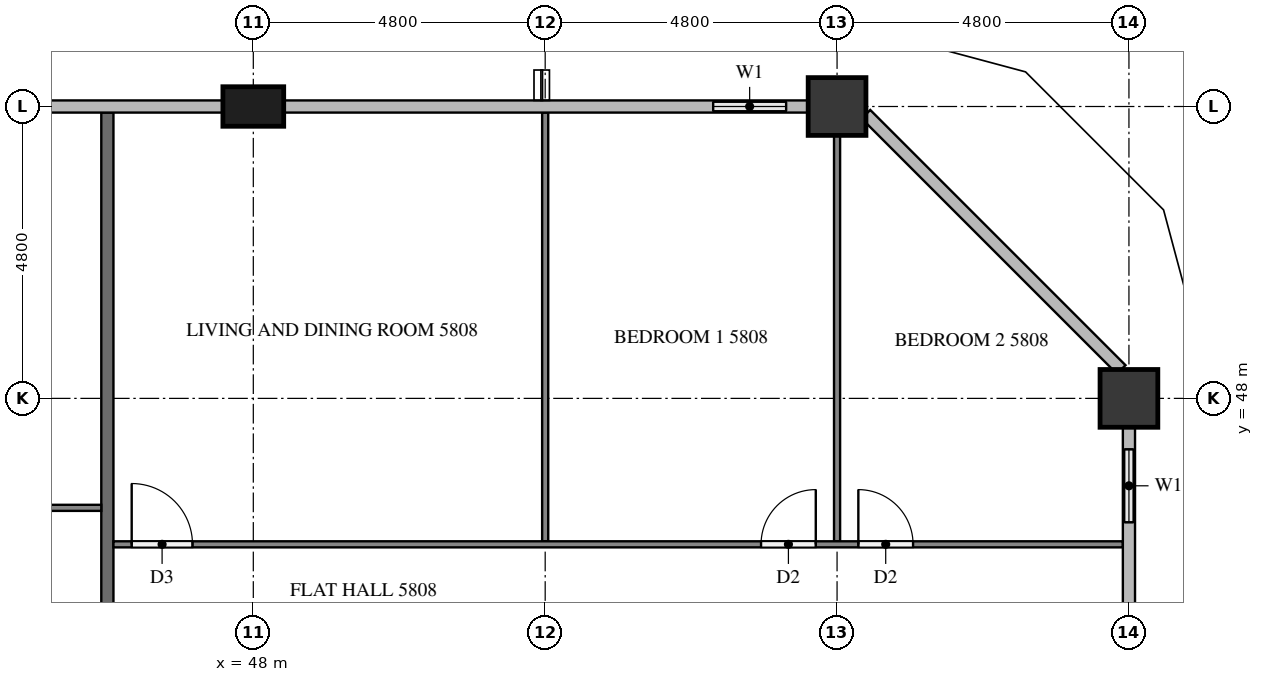
"""IFC4 building model, lengths in metres.
Left out: names, types, materials, properties, quantities, classifications, styles, units other than length and angle.
Written with IfcOpenShell. Run it as: python <this file> out.ifc"""

import sys

from ifc_helpers import new_model, si_unit, direction, frame, frame_2d, origin, origin_2d, place, context, subcontext, project, spatial, rectangle, extrude, element, fill, save


model = new_model("IFC4")
c1 = context("Model", 3, precision=1e-05, world=origin(), true_north=direction((0.0, 1.0)))
c2 = subcontext(c1, "Body", "Model", "MODEL_VIEW")
j1 = project(units=[si_unit("LENGTHUNIT", "METRE"), si_unit("PLANEANGLEUNIT", "RADIAN")], contexts=[c1])
p1 = place(None, origin())
s1 = spatial("IfcSite", under=j1, at=p1, CompositionType="ELEMENT")
p2 = place(p1, origin())
s2 = spatial("IfcBuilding", under=s1, at=p2, CompositionType="ELEMENT")
p3 = place(p2, frame((0.0, 0.0, 222.8)))
s3 = spatial("IfcBuildingStorey", under=s2, at=p3, CompositionType="ELEMENT", Elevation=222.8)
for number, where, z_axis, x_axis in (
    (1, (62.4, 48.0, 0.0), (0.0, 0.0, 1.0), (1.0, 0.0, 0.0)),
    (2, (57.6, 52.8, 0.0), (0.0, 0.0, 1.0), (1.0, 0.0, 0.0)),
):
    element("IfcColumn", number, at=place(p3, frame(where, z_axis=z_axis, x_axis=x_axis)), inside=s3, PredefinedType="COLUMN", context=c2, shape_type="SweptSolid", body=[
        extrude(rectangle(XDim=0.95, YDim=0.95, at=origin_2d()), origin(), (0.0, 0.0, 1.0), 3.2),
    ])
p4 = place(p3, frame((48.0, 52.8, 0.0), z_axis=(0.0, 0.0, 1.0), x_axis=(1.0, 0.0, 0.0)))
e3 = element("IfcColumn", 3, at=p4, inside=s3, PredefinedType="COLUMN", context=c2, shape_type="SweptSolid", body=[
    extrude(rectangle(XDim=1.0, YDim=0.65, at=origin_2d()), origin(), (0.0, 0.0, 1.0), 3.2),
])
p5 = place(p3, frame((62.4, 45.6, 0.0), z_axis=(0.0, 0.0, 1.0), x_axis=(0.0, 1.0, 0.0)))
e4 = element("IfcWall", 4, at=p5, inside=s3, PredefinedType="SOLIDWALL", context=c2, shape_type="SweptSolid", body=[
    extrude(rectangle(XDim=1.925, YDim=0.15, at=frame_2d((0.962, 0.0))), origin(), (0.0, 0.0, 1.0), 3.2),
])
p6 = place(p5, frame((0.363, 0.0, 0.9)))
e5 = element("IfcOpeningElement", 5, at=p6, cuts=e4, PredefinedType="OPENING", context=c2, shape_type="SweptSolid", body=[
    extrude(rectangle(XDim=1.2, YDim=1.4, at=frame_2d((0.6, 0.7))), frame((0.0, 0.085, 0.0), z_axis=(0.0, -1.0, 0.0), x_axis=(1.0, 0.0, 0.0)), (0.0, 0.0, 1.0), 0.17),
])
p7 = place(p3, frame((57.125, 52.8, 0.0), z_axis=(0.0, 0.0, 1.0), x_axis=(-1.0, 0.0, 0.0)))
e6 = element("IfcWall", 6, at=p7, inside=s3, PredefinedType="SOLIDWALL", context=c2, shape_type="SweptSolid", body=[
    extrude(rectangle(XDim=1.925, YDim=0.15, at=frame_2d((0.962, 0.0))), origin(), (0.0, 0.0, 1.0), 3.2),
])
p8 = place(p7, frame((0.363, 0.0, 0.9)))
e7 = element("IfcOpeningElement", 7, at=p8, cuts=e6, PredefinedType="OPENING", context=c2, shape_type="SweptSolid", body=[
    extrude(rectangle(XDim=1.2, YDim=1.4, at=frame_2d((0.6, 0.7))), frame((0.0, 0.085, 0.0), z_axis=(0.0, -1.0, 0.0), x_axis=(1.0, 0.0, 0.0)), (0.0, 0.0, 1.0), 0.17),
])
p9 = place(p3, frame((45.6, 52.7, 0.0), z_axis=(0.0, 0.0, 1.0), x_axis=(0.0, -1.0, 0.0)))
e8 = element("IfcWall", 8, at=p9, inside=s3, PredefinedType="PARTITIONING", context=c2, shape_type="SweptSolid", body=[
    extrude(rectangle(XDim=11.8, YDim=0.2, at=frame_2d((5.9, 0.0))), origin(), (0.0, 0.0, 1.0), 3.2),
])
p10 = place(p3, frame((52.8, 45.65, 0.0), z_axis=(0.0, 0.0, 1.0), x_axis=(0.0, 1.0, 0.0)))
e9 = element("IfcWall", 9, at=p10, inside=s3, PredefinedType="PARTITIONING", context=c2, shape_type="SweptSolid", body=[
    extrude(rectangle(XDim=7.05, YDim=0.1, at=frame_2d((3.525, 0.0))), origin(), (0.0, 0.0, 1.0), 3.2),
])
p11 = place(p3, frame((57.6, 45.65, 0.0), z_axis=(0.0, 0.0, 1.0), x_axis=(0.0, 1.0, 0.0)))
e10 = element("IfcWall", 10, at=p11, inside=s3, PredefinedType="PARTITIONING", context=c2, shape_type="SweptSolid", body=[
    extrude(rectangle(XDim=6.675, YDim=0.1, at=frame_2d((3.337, 0.0))), origin(), (0.0, 0.0, 1.0), 3.2),
])
p12 = place(p3, frame((45.7, 45.6, 0.0), z_axis=(0.0, 0.0, 1.0), x_axis=(1.0, 0.0, 0.0)))
e11 = element("IfcWall", 11, at=p12, inside=s3, PredefinedType="PARTITIONING", context=c2, shape_type="SweptSolid", body=[
    extrude(rectangle(XDim=16.6, YDim=0.1, at=frame_2d((8.3, 0.0))), origin(), (0.0, 0.0, 1.0), 3.2),
])
p13 = place(p12, frame((0.3, 0.0, 0.0)))
e12 = element("IfcOpeningElement", 12, at=p13, cuts=e11, PredefinedType="OPENING", context=c2, shape_type="SweptSolid", body=[
    extrude(rectangle(XDim=1.0, YDim=2.1, at=frame_2d((0.5, 1.05))), frame((0.0, 0.06, 0.0), z_axis=(0.0, -1.0, 0.0), x_axis=(1.0, 0.0, 0.0)), (0.0, 0.0, 1.0), 0.12),
])
p14 = place(p12, frame((10.65, 0.0, 0.0)))
e13 = element("IfcOpeningElement", 13, at=p14, cuts=e11, PredefinedType="OPENING", context=c2, shape_type="SweptSolid", body=[
    extrude(rectangle(XDim=0.9, YDim=2.1, at=frame_2d((0.45, 1.05))), frame((0.0, 0.06, 0.0), z_axis=(0.0, -1.0, 0.0), x_axis=(1.0, 0.0, 0.0)), (0.0, 0.0, 1.0), 0.12),
])
p15 = place(p12, frame((12.25, 0.0, 0.0)))
e14 = element("IfcOpeningElement", 14, at=p15, cuts=e11, PredefinedType="OPENING", context=c2, shape_type="SweptSolid", body=[
    extrude(rectangle(XDim=0.9, YDim=2.1, at=frame_2d((0.45, 1.05))), frame((0.0, 0.06, 0.0), z_axis=(0.0, -1.0, 0.0), x_axis=(1.0, 0.0, 0.0)), (0.0, 0.0, 1.0), 0.12),
])
p16 = place(p3, frame((26.5, 46.2, 0.0), z_axis=(0.0, 0.0, 1.0), x_axis=(1.0, 0.0, 0.0)))
e15 = element("IfcWall", 15, at=p16, inside=s3, PredefinedType="PARTITIONING", context=c2, shape_type="SweptSolid", body=[
    extrude(rectangle(XDim=19.0, YDim=0.1, at=frame_2d((9.5, 0.0))), origin(), (0.0, 0.0, 1.0), 3.2),
])
p17 = place(p16, frame((3.45, 0.0, 0.0)))
e16 = element("IfcOpeningElement", 16, at=p17, cuts=e15, PredefinedType="OPENING", context=c2, shape_type="SweptSolid", body=[
    extrude(rectangle(XDim=0.9, YDim=2.1, at=frame_2d((0.45, 1.05))), frame((0.0, 0.06, 0.0), z_axis=(0.0, -1.0, 0.0), x_axis=(1.0, 0.0, 0.0)), (0.0, 0.0, 1.0), 0.12),
])
p18 = place(p16, frame((5.05, 0.0, 0.0)))
e17 = element("IfcOpeningElement", 17, at=p18, cuts=e15, PredefinedType="OPENING", context=c2, shape_type="SweptSolid", body=[
    extrude(rectangle(XDim=1.0, YDim=2.1, at=frame_2d((0.5, 1.05))), frame((0.0, 0.06, 0.0), z_axis=(0.0, -1.0, 0.0), x_axis=(1.0, 0.0, 0.0)), (0.0, 0.0, 1.0), 0.12),
])
p19 = place(p16, frame((13.05, 0.0, 0.0)))
e18 = element("IfcOpeningElement", 18, at=p19, cuts=e15, PredefinedType="OPENING", context=c2, shape_type="SweptSolid", body=[
    extrude(rectangle(XDim=0.9, YDim=2.1, at=frame_2d((0.45, 1.05))), frame((0.0, 0.06, 0.0), z_axis=(0.0, -1.0, 0.0), x_axis=(1.0, 0.0, 0.0)), (0.0, 0.0, 1.0), 0.12),
])
p20 = place(p16, frame((14.65, 0.0, 0.0)))
e19 = element("IfcOpeningElement", 19, at=p20, cuts=e15, PredefinedType="OPENING", context=c2, shape_type="SweptSolid", body=[
    extrude(rectangle(XDim=0.9, YDim=2.1, at=frame_2d((0.45, 1.05))), frame((0.0, 0.06, 0.0), z_axis=(0.0, -1.0, 0.0), x_axis=(1.0, 0.0, 0.0)), (0.0, 0.0, 1.0), 0.12),
])
p21 = place(p6, origin())
e20 = element("IfcWindow", 20, at=p21, inside=s3, PartitioningType="SINGLE_PANEL", PredefinedType="WINDOW", context=c2, shape_type="SweptSolid", body=[
    extrude(rectangle(XDim=1.2, YDim=1.4, at=frame_2d((0.6, 0.7))), frame((0.0, 0.03, 0.0), z_axis=(0.0, -1.0, 0.0), x_axis=(1.0, 0.0, 0.0)), (0.0, 0.0, 1.0), 0.06),
])
fill(e5, e20)
p22 = place(p8, origin())
e21 = element("IfcWindow", 21, at=p22, inside=s3, PartitioningType="SINGLE_PANEL", PredefinedType="WINDOW", context=c2, shape_type="SweptSolid", body=[
    extrude(rectangle(XDim=1.2, YDim=1.4, at=frame_2d((0.6, 0.7))), frame((0.0, 0.03, 0.0), z_axis=(0.0, -1.0, 0.0), x_axis=(1.0, 0.0, 0.0)), (0.0, 0.0, 1.0), 0.06),
])
fill(e7, e21)
p23 = place(p13, origin())
e22 = element("IfcDoor", 22, at=p23, inside=s3, OperationType="SINGLE_SWING_LEFT", PredefinedType="DOOR", context=c2, shape_type="SweptSolid", body=[
    extrude(rectangle(XDim=1.0, YDim=2.1, at=frame_2d((0.5, 1.05))), frame((0.0, 0.025, 0.0), z_axis=(0.0, -1.0, 0.0), x_axis=(1.0, 0.0, 0.0)), (0.0, 0.0, 1.0), 0.05),
])
fill(e12, e22)
p24 = place(p14, origin())
e23 = element("IfcDoor", 23, at=p24, inside=s3, OperationType="SINGLE_SWING_RIGHT", PredefinedType="DOOR", context=c2, shape_type="SweptSolid", body=[
    extrude(rectangle(XDim=0.9, YDim=2.1, at=frame_2d((0.45, 1.05))), frame((0.0, 0.025, 0.0), z_axis=(0.0, -1.0, 0.0), x_axis=(1.0, 0.0, 0.0)), (0.0, 0.0, 1.0), 0.05),
])
fill(e13, e23)
p25 = place(p15, origin())
e24 = element("IfcDoor", 24, at=p25, inside=s3, OperationType="SINGLE_SWING_LEFT", PredefinedType="DOOR", context=c2, shape_type="SweptSolid", body=[
    extrude(rectangle(XDim=0.9, YDim=2.1, at=frame_2d((0.45, 1.05))), frame((0.0, 0.025, 0.0), z_axis=(0.0, -1.0, 0.0), x_axis=(1.0, 0.0, 0.0)), (0.0, 0.0, 1.0), 0.05),
])
fill(e14, e24)
save(model, sys.argv[1])
